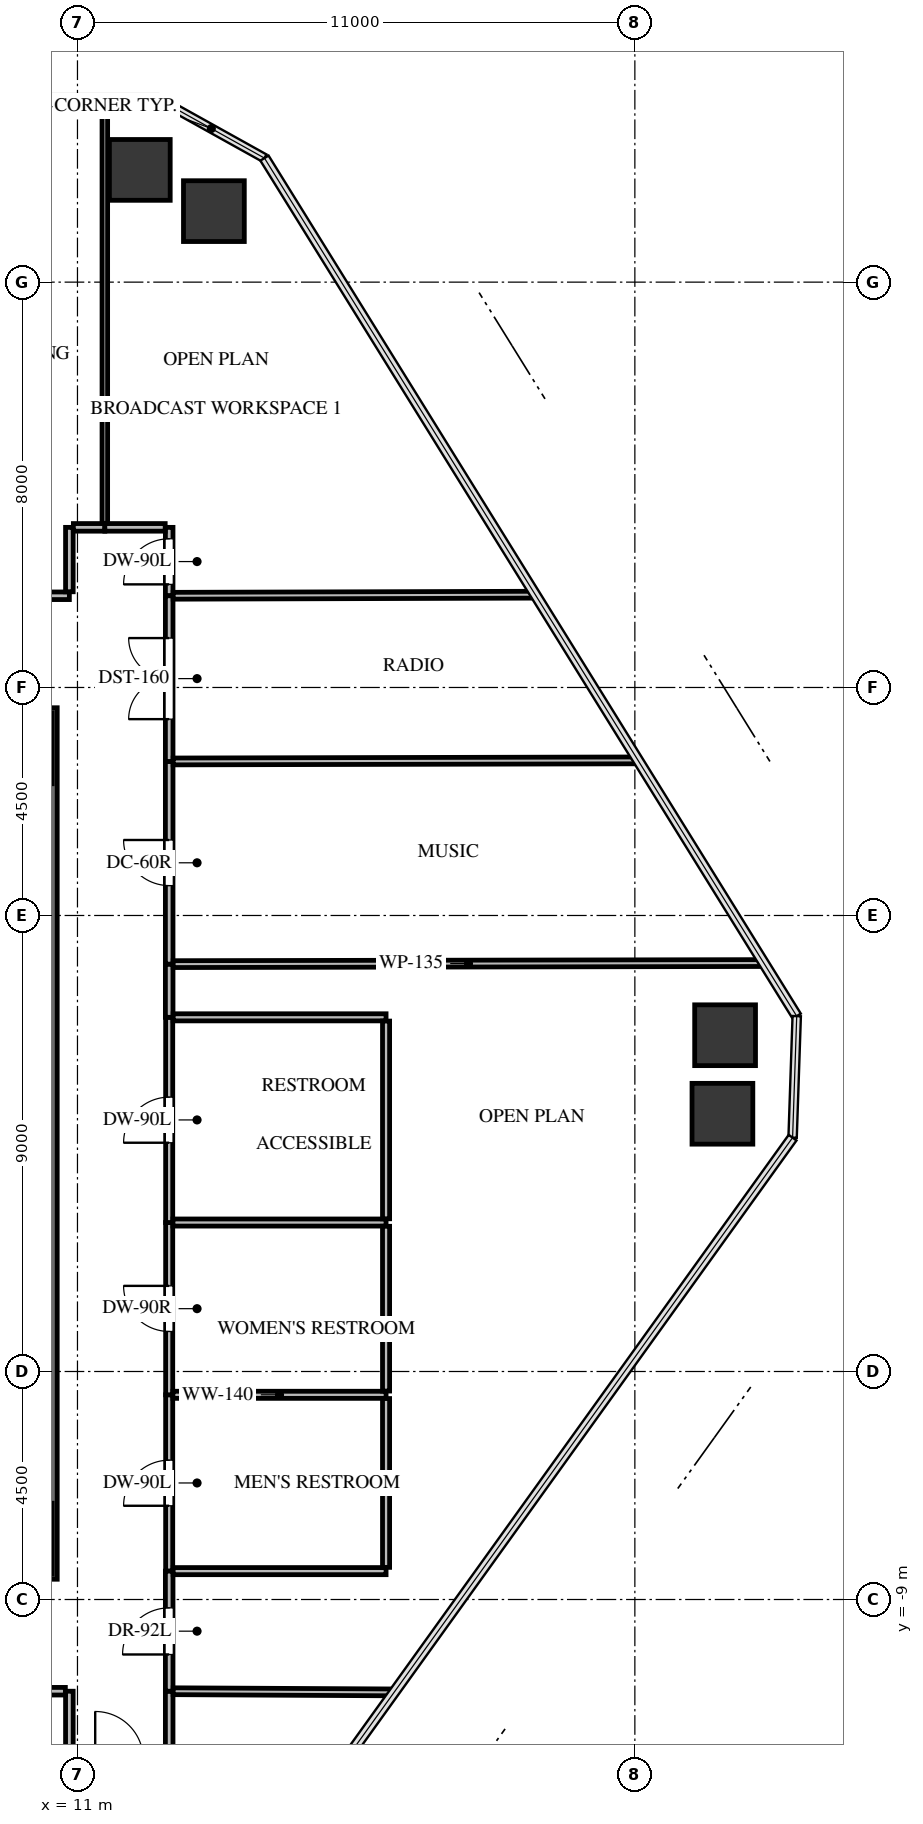
"""IFC4 building model, lengths in metres.
Left out: names, types, materials, properties, quantities, classifications, styles, units other than length and angle.
Written with IfcOpenShell. Run it as: python <this file> out.ifc"""

import sys

from ifc_helpers import new_model, si_unit, direction, frame, frame_2d, origin, origin_2d, place, context, subcontext, project, spatial, rectangle, extrude, source, transform, mapped, element, fill, save


model = new_model("IFC4")
c1 = context("Model", 3, precision=1e-05, world=origin(), true_north=direction((0.0, 1.0)))
c2 = subcontext(c1, "Body", "Model", "MODEL_VIEW")
j1 = project(units=[si_unit("LENGTHUNIT", "METRE"), si_unit("PLANEANGLEUNIT", "RADIAN")], contexts=[c1])
p1 = place(None, origin())
s1 = spatial("IfcSite", under=j1, at=p1, CompositionType="ELEMENT")
p2 = place(p1, origin())
s2 = spatial("IfcBuilding", under=s1, at=p2, CompositionType="ELEMENT")
p3 = place(p2, frame((0.0, 0.0, 127.2)))
s3 = spatial("IfcBuildingStorey", under=s2, at=p3, CompositionType="ELEMENT", Elevation=127.2)
p4 = place(p3, frame((10.225, -8.6, 0.0), z_axis=(0.0, 0.0, 1.0), x_axis=(0.0, 1.0, 0.0)))
e1 = element("IfcWall", 1, at=p4, inside=s3, PredefinedType="SHEAR", context=c2, shape_type="SweptSolid", body=[
    extrude(rectangle(XDim=17.2, YDim=0.75, at=frame_2d((8.6, 0.0))), origin(), (0.0, 0.0, 1.0), 3.3),
])
m1 = source(origin(), c2, "Body", "SweptSolid", [
    extrude(rectangle(XDim=1.2, YDim=1.2, at=origin_2d()), origin(), (0.0, 0.0, 1.0), 3.3),
])
for number, where, z_axis, x_axis in (
    (2, (12.23, 19.215, -0.24), (0.0, 0.0, 1.0), (1.0, 0.0, 0.0)),
    (3, (13.692, 18.401, -0.24), (0.0, 0.0, 1.0), (1.0, 0.0, 0.0)),
    (4, (23.781, 2.137, -0.24), (0.0, 0.0, 1.0), (1.0, 0.0, 0.0)),
    (5, (23.728, 0.587, -0.24), (0.0, 0.0, 1.0), (1.0, 0.0, 0.0)),
):
    element("IfcColumn", number, at=place(p3, frame(where, z_axis=z_axis, x_axis=x_axis)), inside=s3, PredefinedType="COLUMN", context=c2, shape_type="MappedRepresentation", body=[
        mapped(m1, transform((0.0, 0.0, 0.0), x_axis=(1.0, 0.0, 0.0), y_axis=(0.0, 1.0, 0.0), z_axis=(0.0, 0.0, 1.0), scale=1.0)),
    ])
p5 = place(p3, frame((12.81, -8.44, 0.0), z_axis=(0.0, 0.0, 1.0), x_axis=(0.0, 1.0, 0.0)))
e6 = element("IfcWall", 6, at=p5, inside=s3, PredefinedType="PARTITIONING", context=c2, shape_type="SweptSolid", body=[
    extrude(rectangle(XDim=3.48, YDim=0.14, at=frame_2d((1.74, 0.0))), origin(), (0.0, 0.0, 1.0), 3.045),
])
p6 = place(p5, frame((1.29, 0.0, 0.0)))
e7 = element("IfcOpeningElement", 7, at=p6, cuts=e6, PredefinedType="OPENING", context=c2, shape_type="SweptSolid", body=[
    extrude(rectangle(XDim=0.9, YDim=2.05, at=frame_2d((0.45, 1.025))), frame((0.0, 0.08, 0.0), z_axis=(0.0, -1.0, 0.0), x_axis=(1.0, 0.0, 0.0)), (0.0, 0.0, 1.0), 0.16),
])
p7 = place(p3, frame((12.81, -4.96, 0.0), z_axis=(0.0, 0.0, 1.0), x_axis=(0.0, 1.0, 0.0)))
e8 = element("IfcWall", 8, at=p7, inside=s3, PredefinedType="PARTITIONING", context=c2, shape_type="SweptSolid", body=[
    extrude(rectangle(XDim=3.4, YDim=0.14, at=frame_2d((1.7, 0.0))), origin(), (0.0, 0.0, 1.0), 3.045),
])
p8 = place(p7, frame((1.25, 0.0, 0.0)))
e9 = element("IfcOpeningElement", 9, at=p8, cuts=e8, PredefinedType="OPENING", context=c2, shape_type="SweptSolid", body=[
    extrude(rectangle(XDim=0.9, YDim=2.05, at=frame_2d((0.45, 1.025))), frame((0.0, 0.08, 0.0), z_axis=(0.0, -1.0, 0.0), x_axis=(1.0, 0.0, 0.0)), (0.0, 0.0, 1.0), 0.16),
])
p9 = place(p3, frame((12.81, -1.56, 0.0), z_axis=(0.0, 0.0, 1.0), x_axis=(0.0, 1.0, 0.0)))
e10 = element("IfcWall", 10, at=p9, inside=s3, PredefinedType="PARTITIONING", context=c2, shape_type="SweptSolid", body=[
    extrude(rectangle(XDim=4.05, YDim=0.14, at=frame_2d((2.025, 0.0))), origin(), (0.0, 0.0, 1.0), 2.212),
])
p10 = place(p9, frame((1.575, 0.0, 0.0)))
e11 = element("IfcOpeningElement", 11, at=p10, cuts=e10, PredefinedType="OPENING", context=c2, shape_type="SweptSolid", body=[
    extrude(rectangle(XDim=0.9, YDim=2.05, at=frame_2d((0.45, 1.025))), frame((0.0, 0.08, 0.0), z_axis=(0.0, -1.0, 0.0), x_axis=(1.0, 0.0, 0.0)), (0.0, 0.0, 1.0), 0.16),
])
p11 = place(p3, frame((10.84, 10.81, 0.0), z_axis=(0.0, 0.0, 1.0), x_axis=(-1.0, 0.0, 0.0)))
e12 = element("IfcWall", 12, at=p11, inside=s3, PredefinedType="PARTITIONING", context=c2, shape_type="SweptSolid", body=[
    extrude(rectangle(XDim=4.3, YDim=0.15, at=frame_2d((2.15, 0.0))), origin(), (0.0, 0.0, 1.0), 2.212),
])
p12 = place(p11, frame((1.69, 0.0, 0.0)))
e13 = element("IfcOpeningElement", 13, at=p12, cuts=e12, PredefinedType="OPENING", context=c2, shape_type="SweptSolid", body=[
    extrude(rectangle(XDim=0.92, YDim=2.1, at=frame_2d((0.46, 1.05))), frame((0.0, 0.085, 0.0), z_axis=(0.0, -1.0, 0.0), x_axis=(1.0, 0.0, 0.0)), (0.0, 0.0, 1.0), 0.17),
])
p13 = place(p3, frame((10.84, 12.16, 0.0), z_axis=(0.0, 0.0, 1.0), x_axis=(0.0, -1.0, 0.0)))
e14 = element("IfcWall", 14, at=p13, inside=s3, PredefinedType="PARTITIONING", context=c2, shape_type="SweptSolid", body=[
    extrude(rectangle(XDim=1.271, YDim=0.15, at=frame_2d((0.635, 0.0))), origin(), (0.0, 0.0, 1.0), 2.212),
])
p14 = place(p3, frame((11.54, 12.16, 0.0), z_axis=(0.0, 0.0, 1.0), x_axis=(-1.0, 0.0, 0.0)))
e15 = element("IfcWall", 15, at=p14, inside=s3, PredefinedType="PARTITIONING", context=c2, shape_type="SweptSolid", body=[
    extrude(rectangle(XDim=0.621, YDim=0.15, at=frame_2d((0.311, 0.0))), origin(), (0.0, 0.0, 1.0), 2.212),
])
p15 = place(p3, frame((12.81, 10.81, 0.0), z_axis=(0.0, 0.0, 1.0), x_axis=(0.0, 1.0, 0.0)))
e16 = element("IfcWall", 16, at=p15, inside=s3, PredefinedType="PARTITIONING", context=c2, shape_type="SweptSolid", body=[
    extrude(rectangle(XDim=1.35, YDim=0.15, at=frame_2d((0.675, 0.0))), origin(), (0.0, 0.0, 1.0), 3.045),
])
p16 = place(p15, frame((0.225, 0.0, 0.0)))
e17 = element("IfcOpeningElement", 17, at=p16, cuts=e16, PredefinedType="OPENING", context=c2, shape_type="SweptSolid", body=[
    extrude(rectangle(XDim=0.9, YDim=2.05, at=frame_2d((0.45, 1.025))), frame((0.0, 0.085, 0.0), z_axis=(0.0, -1.0, 0.0), x_axis=(1.0, 0.0, 0.0)), (0.0, 0.0, 1.0), 0.17),
])
p17 = place(p3, frame((12.731, 12.16, 0.0), z_axis=(0.0, 0.0, 1.0), x_axis=(-1.0, 0.0, 0.0)))
e18 = element("IfcWall", 18, at=p17, inside=s3, PredefinedType="PARTITIONING", context=c2, shape_type="SweptSolid", body=[
    extrude(rectangle(XDim=1.191, YDim=0.15, at=frame_2d((0.595, 0.0))), origin(), (0.0, 0.0, 1.0), 2.212),
])
for number, where, z_axis, x_axis in (
    (19, (10.84, -10.81, 0.0), (0.0, 0.0, 1.0), (0.0, -1.0, 0.0)),
    (20, (12.81, -12.081, 0.0), (0.0, 0.0, 1.0), (0.0, 1.0, 0.0)),
):
    element("IfcWall", number, at=place(p3, frame(where, z_axis=z_axis, x_axis=x_axis)), inside=s3, PredefinedType="PARTITIONING", context=c2, shape_type="SweptSolid", body=[
        extrude(rectangle(XDim=1.271, YDim=0.15, at=frame_2d((0.635, 0.0))), origin(), (0.0, 0.0, 1.0), 3.045),
    ])
p18 = place(p3, frame((10.04, -10.81, 0.0), z_axis=(0.0, 0.0, 1.0), x_axis=(1.0, 0.0, 0.0)))
e21 = element("IfcWall", 21, at=p18, inside=s3, PredefinedType="PARTITIONING", context=c2, shape_type="SweptSolid", body=[
    extrude(rectangle(XDim=0.721, YDim=0.15, at=frame_2d((0.36, 0.0))), origin(), (0.0, 0.0, 1.0), 3.045),
])
p19 = place(p3, frame((12.81, -10.81, 0.0), z_axis=(0.0, 0.0, 1.0), x_axis=(0.0, 1.0, 0.0)))
e22 = element("IfcWall", 22, at=p19, inside=s3, PredefinedType="PARTITIONING", context=c2, shape_type="SweptSolid", body=[
    extrude(rectangle(XDim=2.37, YDim=0.15, at=frame_2d((1.185, 0.0))), origin(), (0.0, 0.0, 1.0), 3.045),
])
p20 = place(p19, frame((0.725, 0.0, 0.0)))
e23 = element("IfcOpeningElement", 23, at=p20, cuts=e22, PredefinedType="OPENING", context=c2, shape_type="SweptSolid", body=[
    extrude(rectangle(XDim=0.92, YDim=2.1, at=frame_2d((0.46, 1.05))), frame((0.0, 0.085, 0.0), z_axis=(0.0, -1.0, 0.0), x_axis=(1.0, 0.0, 0.0)), (0.0, 0.0, 1.0), 0.17),
])
p21 = place(p3, frame((12.81, 2.49, 0.0), z_axis=(0.0, 0.0, 1.0), x_axis=(0.0, 1.0, 0.0)))
e24 = element("IfcWall", 24, at=p21, inside=s3, PredefinedType="PARTITIONING", context=c2, shape_type="SweptSolid", body=[
    extrude(rectangle(XDim=1.05, YDim=0.15, at=frame_2d((0.525, 0.0))), origin(), (0.0, 0.0, 1.0), 3.045),
])
p22 = place(p3, frame((12.81, 3.54, 0.0), z_axis=(0.0, 0.0, 1.0), x_axis=(0.0, 1.0, 0.0)))
e25 = element("IfcWall", 25, at=p22, inside=s3, PredefinedType="PARTITIONING", context=c2, shape_type="SweptSolid", body=[
    extrude(rectangle(XDim=4.0, YDim=0.15, at=frame_2d((2.0, 0.0))), origin(), (0.0, 0.0, 1.0), 3.045),
])
p23 = place(p22, frame((1.55, 0.0, 0.0)))
e26 = element("IfcOpeningElement", 26, at=p23, cuts=e25, PredefinedType="OPENING", context=c2, shape_type="SweptSolid", body=[
    extrude(rectangle(XDim=0.9, YDim=2.05, at=frame_2d((0.45, 1.025))), frame((0.0, 0.085, 0.0), z_axis=(0.0, -1.0, 0.0), x_axis=(1.0, 0.0, 0.0)), (0.0, 0.0, 1.0), 0.17),
])
p24 = place(p3, frame((12.81, 7.54, 0.0), z_axis=(0.0, 0.0, 1.0), x_axis=(0.0, 1.0, 0.0)))
e27 = element("IfcWall", 27, at=p24, inside=s3, PredefinedType="PARTITIONING", context=c2, shape_type="SweptSolid", body=[
    extrude(rectangle(XDim=3.27, YDim=0.15, at=frame_2d((1.635, 0.0))), origin(), (0.0, 0.0, 1.0), 3.045),
])
p25 = place(p24, frame((0.835, 0.0, 0.0)))
e28 = element("IfcOpeningElement", 28, at=p25, cuts=e27, PredefinedType="OPENING", context=c2, shape_type="SweptSolid", body=[
    extrude(rectangle(XDim=1.6, YDim=2.15, at=frame_2d((0.8, 1.075))), frame((0.0, 0.085, 0.0), z_axis=(0.0, -1.0, 0.0), x_axis=(1.0, 0.0, 0.0)), (0.0, 0.0, 1.0), 0.17),
])
p26 = place(p3, frame((12.884, -4.96, 0.0), z_axis=(0.0, 0.0, 1.0), x_axis=(1.0, 0.0, 0.0)))
e29 = element("IfcWall", 29, at=p26, inside=s3, PredefinedType="PARTITIONING", context=c2, shape_type="SweptSolid", body=[
    extrude(rectangle(XDim=4.206, YDim=0.14, at=frame_2d((2.103, 0.0))), origin(), (0.0, 0.0, 1.0), 3.045),
])
p27 = place(p3, frame((17.09, -8.44, 0.0), z_axis=(0.0, 0.0, 1.0), x_axis=(-1.0, 0.0, 0.0)))
e30 = element("IfcWall", 30, at=p27, inside=s3, PredefinedType="PARTITIONING", context=c2, shape_type="SweptSolid", body=[
    extrude(rectangle(XDim=4.201, YDim=0.14, at=frame_2d((2.101, 0.0))), origin(), (0.0, 0.0, 1.0), 2.38),
])
p28 = place(p3, frame((17.09, -5.034, 0.0), z_axis=(0.0, 0.0, 1.0), x_axis=(0.0, -1.0, 0.0)))
e31 = element("IfcWall", 31, at=p28, inside=s3, PredefinedType="PARTITIONING", context=c2, shape_type="SweptSolid", body=[
    extrude(rectangle(XDim=3.332, YDim=0.14, at=frame_2d((1.666, 0.0))), origin(), (0.0, 0.0, 1.0), 2.38),
])
p29 = place(p3, frame((12.884, -1.56, 0.0), z_axis=(0.0, 0.0, 1.0), x_axis=(1.0, 0.0, 0.0)))
e32 = element("IfcWall", 32, at=p29, inside=s3, PredefinedType="PARTITIONING", context=c2, shape_type="SweptSolid", body=[
    extrude(rectangle(XDim=4.206, YDim=0.14, at=frame_2d((2.103, 0.0))), origin(), (0.0, 0.0, 1.0), 3.045),
])
p30 = place(p3, frame((17.09, -1.634, 0.0), z_axis=(0.0, 0.0, 1.0), x_axis=(0.0, -1.0, 0.0)))
e33 = element("IfcWall", 33, at=p30, inside=s3, PredefinedType="PARTITIONING", context=c2, shape_type="SweptSolid", body=[
    extrude(rectangle(XDim=3.252, YDim=0.14, at=frame_2d((1.626, 0.0))), origin(), (0.0, 0.0, 1.0), 3.045),
])
p31 = place(p3, frame((12.889, 2.49, 0.0), z_axis=(0.0, 0.0, 1.0), x_axis=(1.0, 0.0, 0.0)))
e34 = element("IfcWall", 34, at=p31, inside=s3, PredefinedType="PARTITIONING", context=c2, shape_type="SweptSolid", body=[
    extrude(rectangle(XDim=4.201, YDim=0.14, at=frame_2d((2.101, 0.0))), origin(), (0.0, 0.0, 1.0), 3.045),
])
p32 = place(p3, frame((17.09, 2.416, 0.0), z_axis=(0.0, 0.0, 1.0), x_axis=(0.0, -1.0, 0.0)))
e35 = element("IfcWall", 35, at=p32, inside=s3, PredefinedType="PARTITIONING", context=c2, shape_type="SweptSolid", body=[
    extrude(rectangle(XDim=3.902, YDim=0.14, at=frame_2d((1.951, 0.0))), origin(), (0.0, 0.0, 1.0), 2.212),
])
p33 = place(p3, frame((11.54, 20.615, 0.0), z_axis=(0.0, 0.0, 1.0), x_axis=(0.0, -1.0, 0.0)))
e36 = element("IfcWall", 36, at=p33, inside=s3, PredefinedType="MOVABLE", context=c2, shape_type="SweptSolid", body=[
    extrude(rectangle(XDim=8.376, YDim=0.11, at=frame_2d((4.188, 0.0))), origin(), (0.0, 0.0, 1.0), 2.212),
])
p34 = place(p3, frame((20.035, 10.831, 0.0), z_axis=(0.0, 0.0, 1.0), x_axis=(-0.999995783715, -0.002903885812, 0.0)))
e37 = element("IfcWall", 37, at=p34, inside=s3, PredefinedType="PARTITIONING", context=c2, shape_type="SweptSolid", body=[
    extrude(rectangle(XDim=7.146, YDim=0.135, at=frame_2d((3.573, 0.0))), origin(), (0.0, 0.0, 1.0), 2.38),
])
p35 = place(p3, frame((12.889, -10.81, 0.0), z_axis=(0.0, 0.0, 1.0), x_axis=(0.999986140562, -0.005264853658, 0.0)))
e38 = element("IfcWall", 38, at=p35, inside=s3, PredefinedType="PARTITIONING", context=c2, shape_type="SweptSolid", body=[
    extrude(rectangle(XDim=4.359, YDim=0.135, at=frame_2d((2.179, 0.0))), origin(), (0.0, 0.0, 1.0), 2.38),
])
p36 = place(p3, frame((12.889, 3.54, 0.0), z_axis=(0.0, 0.0, 1.0), x_axis=(0.999998377575, 0.001801345995, 0.0)))
e39 = element("IfcWall", 39, at=p36, inside=s3, PredefinedType="PARTITIONING", context=c2, shape_type="SweptSolid", body=[
    extrude(rectangle(XDim=11.656, YDim=0.135, at=frame_2d((5.828, 0.0))), origin(), (0.0, 0.0, 1.0), 2.38),
])
p37 = place(p3, frame((12.889, 7.54, 0.0), z_axis=(0.0, 0.0, 1.0), x_axis=(0.99999744191, 0.002261895808, 0.0)))
e40 = element("IfcWall", 40, at=p37, inside=s3, PredefinedType="PARTITIONING", context=c2, shape_type="SweptSolid", body=[
    extrude(rectangle(XDim=9.175, YDim=0.135, at=frame_2d((4.587, 0.0))), origin(), (0.0, 0.0, 1.0), 2.38),
])
m2 = source(origin(), c2, "Body", "SweptSolid", [
    extrude(rectangle(XDim=0.9, YDim=2.05, at=frame_2d((0.45, 1.025))), frame((0.0, 0.025, 0.0), z_axis=(0.0, -1.0, 0.0), x_axis=(1.0, 0.0, 0.0)), (0.0, 0.0, 1.0), 0.05),
])
p38 = place(p6, origin())
e41 = element("IfcDoor", 41, at=p38, inside=s3, OperationType="SINGLE_SWING_LEFT", PredefinedType="DOOR", context=c2, shape_type="MappedRepresentation", body=[
    mapped(m2, transform((0.0, 0.0, 0.0), x_axis=(1.0, 0.0, 0.0), y_axis=(0.0, 1.0, 0.0), z_axis=(0.0, 0.0, 1.0), scale=1.0)),
])
fill(e7, e41)
m3 = source(origin(), c2, "Body", "SweptSolid", [
    extrude(rectangle(XDim=0.9, YDim=2.05, at=frame_2d((0.45, 1.025))), frame((0.0, 0.025, 0.0), z_axis=(0.0, -1.0, 0.0), x_axis=(1.0, 0.0, 0.0)), (0.0, 0.0, 1.0), 0.05),
])
p39 = place(p8, origin())
e42 = element("IfcDoor", 42, at=p39, inside=s3, OperationType="SINGLE_SWING_RIGHT", PredefinedType="DOOR", context=c2, shape_type="MappedRepresentation", body=[
    mapped(m3, transform((0.0, 0.0, 0.0), x_axis=(1.0, 0.0, 0.0), y_axis=(0.0, 1.0, 0.0), z_axis=(0.0, 0.0, 1.0), scale=1.0)),
])
fill(e9, e42)
p40 = place(p10, origin())
e43 = element("IfcDoor", 43, at=p40, inside=s3, OperationType="SINGLE_SWING_LEFT", PredefinedType="DOOR", context=c2, shape_type="MappedRepresentation", body=[
    mapped(m2, transform((0.0, 0.0, 0.0), x_axis=(1.0, 0.0, 0.0), y_axis=(0.0, 1.0, 0.0), z_axis=(0.0, 0.0, 1.0), scale=1.0)),
])
fill(e11, e43)
p41 = place(p16, origin())
e44 = element("IfcDoor", 44, at=p41, inside=s3, OperationType="SINGLE_SWING_LEFT", PredefinedType="DOOR", context=c2, shape_type="MappedRepresentation", body=[
    mapped(m2, transform((0.0, 0.0, 0.0), x_axis=(1.0, 0.0, 0.0), y_axis=(0.0, 1.0, 0.0), z_axis=(0.0, 0.0, 1.0), scale=1.0)),
])
fill(e17, e44)
m4 = source(origin(), c2, "Body", "SweptSolid", [
    extrude(rectangle(XDim=0.92, YDim=2.1, at=frame_2d((0.46, 1.05))), frame((0.0, 0.025, 0.0), z_axis=(0.0, -1.0, 0.0), x_axis=(1.0, 0.0, 0.0)), (0.0, 0.0, 1.0), 0.05),
])
p42 = place(p20, origin())
e45 = element("IfcDoor", 45, at=p42, inside=s3, OperationType="SINGLE_SWING_LEFT", PredefinedType="DOOR", context=c2, shape_type="MappedRepresentation", body=[
    mapped(m4, transform((0.0, 0.0, 0.0), x_axis=(1.0, 0.0, 0.0), y_axis=(0.0, 1.0, 0.0), z_axis=(0.0, 0.0, 1.0), scale=1.0)),
])
fill(e23, e45)
m5 = source(origin(), c2, "Body", "SweptSolid", [
    extrude(rectangle(XDim=0.9, YDim=2.05, at=frame_2d((0.45, 1.025))), frame((0.0, 0.025, 0.0), z_axis=(0.0, -1.0, 0.0), x_axis=(1.0, 0.0, 0.0)), (0.0, 0.0, 1.0), 0.05),
])
p43 = place(p23, origin())
e46 = element("IfcDoor", 46, at=p43, inside=s3, OperationType="SINGLE_SWING_RIGHT", PredefinedType="DOOR", context=c2, shape_type="MappedRepresentation", body=[
    mapped(m5, transform((0.0, 0.0, 0.0), x_axis=(1.0, 0.0, 0.0), y_axis=(0.0, 1.0, 0.0), z_axis=(0.0, 0.0, 1.0), scale=1.0)),
])
fill(e26, e46)
m6 = source(origin(), c2, "Body", "SweptSolid", [
    extrude(rectangle(XDim=1.6, YDim=2.15, at=frame_2d((0.8, 1.075))), frame((0.0, 0.025, 0.0), z_axis=(0.0, -1.0, 0.0), x_axis=(1.0, 0.0, 0.0)), (0.0, 0.0, 1.0), 0.05),
])
p44 = place(p25, origin())
e47 = element("IfcDoor", 47, at=p44, inside=s3, OperationType="DOUBLE_DOOR_SINGLE_SWING", PredefinedType="DOOR", context=c2, shape_type="MappedRepresentation", body=[
    mapped(m6, transform((0.0, 0.0, 0.0), x_axis=(1.0, 0.0, 0.0), y_axis=(0.0, 1.0, 0.0), z_axis=(0.0, 0.0, 1.0), scale=1.0)),
])
fill(e28, e47)
save(model, sys.argv[1])
